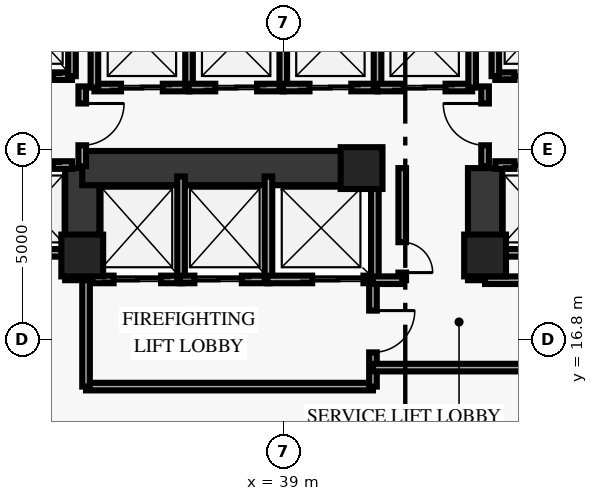
"""IFC4 building model, lengths in metres.
Left out: names, types, materials, properties, quantities, classifications, styles, units other than length and angle.
Written with IfcOpenShell. Run it as: python <this file> out.ifc"""

import sys

from ifc_helpers import new_model, si_unit, direction, frame, frame_2d, origin, origin_2d, place, context, subcontext, project, spatial, rectangle, extrude, element, fill, save


model = new_model("IFC4")
c1 = context("Model", 3, precision=1e-05, world=origin(), true_north=direction((0.0, 1.0)))
c2 = subcontext(c1, "Body", "Model", "MODEL_VIEW")
j1 = project(units=[si_unit("LENGTHUNIT", "METRE"), si_unit("PLANEANGLEUNIT", "RADIAN")], contexts=[c1])
p1 = place(None, origin())
s1 = spatial("IfcSite", under=j1, at=p1, CompositionType="ELEMENT")
p2 = place(p1, origin())
s2 = spatial("IfcBuilding", under=s1, at=p2, CompositionType="ELEMENT")
p3 = place(p2, origin())
s3 = spatial("IfcBuildingStorey", under=s2, at=p3, CompositionType="ELEMENT", Elevation=0.0)
for number, where, z_axis, x_axis in (
    (1, (33.7, 19.0, 0.0), (0.0, 0.0, 1.0), (1.0, 0.0, 0.0)),
    (2, (41.05, 21.3, 0.0), (0.0, 0.0, 1.0), (1.0, 0.0, 0.0)),
    (3, (44.3, 19.0, 0.0), (0.0, 0.0, 1.0), (1.0, 0.0, 0.0)),
):
    element("IfcColumn", number, at=place(p3, frame(where, z_axis=z_axis, x_axis=x_axis)), inside=s3, PredefinedType="PILASTER", context=c2, shape_type="SweptSolid", body=[
        extrude(rectangle(XDim=1.1, YDim=1.1, at=origin_2d()), origin(), (0.0, 0.0, 1.0), 5.7),
    ])
for number, where, z_axis, x_axis in (
    (4, (33.7, 18.35, 0.0), (0.0, 0.0, 1.0), (0.0, 1.0, 0.0)),
    (5, (44.3, 18.35, 0.0), (0.0, 0.0, 1.0), (0.0, 1.0, 0.0)),
):
    element("IfcWall", number, at=place(p3, frame(where, z_axis=z_axis, x_axis=x_axis)), inside=s3, PredefinedType="SHEAR", context=c2, shape_type="SweptSolid", body=[
        extrude(rectangle(XDim=2.95, YDim=0.9, at=frame_2d((1.475, 0.0))), origin(), (0.0, 0.0, 1.0), 5.7),
    ])
p4 = place(p3, frame((33.7, 21.3, 0.0), z_axis=(0.0, 0.0, 1.0), x_axis=(1.0, 0.0, 0.0)))
e6 = element("IfcWall", 6, at=p4, inside=s3, PredefinedType="SHEAR", context=c2, shape_type="SweptSolid", body=[
    extrude(rectangle(XDim=7.55, YDim=0.9, at=frame_2d((3.775, 0.0))), origin(), (0.0, 0.0, 1.0), 5.7),
])
p5 = place(p3, frame((31.32, 23.72, 0.0), z_axis=(0.0, 0.0, 1.0), x_axis=(1.0, 0.0, 0.0)))
e7 = element("IfcWall", 7, at=p5, inside=s3, PredefinedType="SOLIDWALL", context=c2, shape_type="SweptSolid", body=[
    extrude(rectangle(XDim=2.11, YDim=0.2, at=frame_2d((1.055, 0.0))), origin(), (0.0, 0.0, 1.0), 5.7),
])
p6 = place(p5, frame((0.505, 0.0, 0.0)))
e8 = element("IfcOpeningElement", 8, at=p6, cuts=e7, PredefinedType="OPENING", context=c2, shape_type="SweptSolid", body=[
    extrude(rectangle(XDim=1.1, YDim=2.15, at=frame_2d((0.55, 1.075))), frame((0.0, 0.11, 0.0), z_axis=(0.0, -1.0, 0.0), x_axis=(1.0, 0.0, 0.0)), (0.0, 0.0, 1.0), 0.22),
])
p7 = place(p3, frame((33.43, 23.72, 0.0), z_axis=(0.0, 0.0, 1.0), x_axis=(0.0, 1.0, 0.0)))
e9 = element("IfcWall", 9, at=p7, inside=s3, PredefinedType="SOLIDWALL", context=c2, shape_type="SweptSolid", body=[
    extrude(rectangle(XDim=2.41, YDim=0.2, at=frame_2d((1.205, 0.0))), origin(), (0.0, 0.0, 1.0), 5.7),
])
p8 = place(p3, frame((31.32, 19.07, 0.0), z_axis=(0.0, 0.0, 1.0), x_axis=(1.0, 0.0, 0.0)))
e10 = element("IfcWall", 10, at=p8, inside=s3, PredefinedType="SOLIDWALL", context=c2, shape_type="SweptSolid", body=[
    extrude(rectangle(XDim=2.11, YDim=0.2, at=frame_2d((1.055, 0.0))), origin(), (0.0, 0.0, 1.0), 5.7),
])
p9 = place(p3, frame((31.32, 21.38, 0.0), z_axis=(0.0, 0.0, 1.0), x_axis=(1.0, 0.0, 0.0)))
e11 = element("IfcWall", 11, at=p9, inside=s3, PredefinedType="SOLIDWALL", context=c2, shape_type="SweptSolid", body=[
    extrude(rectangle(XDim=2.11, YDim=0.2, at=frame_2d((1.055, 0.0))), origin(), (0.0, 0.0, 1.0), 5.7),
])
p10 = place(p9, frame((0.505, 0.0, 0.0)))
e12 = element("IfcOpeningElement", 12, at=p10, cuts=e11, PredefinedType="OPENING", context=c2, shape_type="SweptSolid", body=[
    extrude(rectangle(XDim=1.1, YDim=2.15, at=frame_2d((0.55, 1.075))), frame((0.0, 0.11, 0.0), z_axis=(0.0, -1.0, 0.0), x_axis=(1.0, 0.0, 0.0)), (0.0, 0.0, 1.0), 0.22),
])
p11 = place(p3, frame((44.57, 23.72, 0.0), z_axis=(0.0, 0.0, 1.0), x_axis=(1.0, 0.0, 0.0)))
e13 = element("IfcWall", 13, at=p11, inside=s3, PredefinedType="SOLIDWALL", context=c2, shape_type="SweptSolid", body=[
    extrude(rectangle(XDim=2.11, YDim=0.2, at=frame_2d((1.055, 0.0))), origin(), (0.0, 0.0, 1.0), 5.7),
])
p12 = place(p11, frame((0.505, 0.0, 0.0)))
e14 = element("IfcOpeningElement", 14, at=p12, cuts=e13, PredefinedType="OPENING", context=c2, shape_type="SweptSolid", body=[
    extrude(rectangle(XDim=1.1, YDim=2.15, at=frame_2d((0.55, 1.075))), frame((0.0, 0.11, 0.0), z_axis=(0.0, -1.0, 0.0), x_axis=(1.0, 0.0, 0.0)), (0.0, 0.0, 1.0), 0.22),
])
p13 = place(p3, frame((44.57, 23.72, 0.0), z_axis=(0.0, 0.0, 1.0), x_axis=(0.0, 1.0, 0.0)))
e15 = element("IfcWall", 15, at=p13, inside=s3, PredefinedType="SOLIDWALL", context=c2, shape_type="SweptSolid", body=[
    extrude(rectangle(XDim=2.41, YDim=0.2, at=frame_2d((1.205, 0.0))), origin(), (0.0, 0.0, 1.0), 5.7),
])
p14 = place(p3, frame((44.57, 19.07, 0.0), z_axis=(0.0, 0.0, 1.0), x_axis=(1.0, 0.0, 0.0)))
e16 = element("IfcWall", 16, at=p14, inside=s3, PredefinedType="SOLIDWALL", context=c2, shape_type="SweptSolid", body=[
    extrude(rectangle(XDim=2.11, YDim=0.2, at=frame_2d((1.055, 0.0))), origin(), (0.0, 0.0, 1.0), 5.7),
])
p15 = place(p3, frame((44.57, 21.38, 0.0), z_axis=(0.0, 0.0, 1.0), x_axis=(1.0, 0.0, 0.0)))
e17 = element("IfcWall", 17, at=p15, inside=s3, PredefinedType="SOLIDWALL", context=c2, shape_type="SweptSolid", body=[
    extrude(rectangle(XDim=2.11, YDim=0.2, at=frame_2d((1.055, 0.0))), origin(), (0.0, 0.0, 1.0), 5.7),
])
p16 = place(p15, frame((0.505, 0.0, 0.0)))
e18 = element("IfcOpeningElement", 18, at=p16, cuts=e17, PredefinedType="OPENING", context=c2, shape_type="SweptSolid", body=[
    extrude(rectangle(XDim=1.1, YDim=2.15, at=frame_2d((0.55, 1.075))), frame((0.0, 0.11, 0.0), z_axis=(0.0, -1.0, 0.0), x_axis=(1.0, 0.0, 0.0)), (0.0, 0.0, 1.0), 0.22),
])
p17 = place(p3, frame((34.02, 23.42, 0.0), z_axis=(0.0, 0.0, 1.0), x_axis=(1.0, 0.0, 0.0)))
e19 = element("IfcWall", 19, at=p17, inside=s3, PredefinedType="SOLIDWALL", context=c2, shape_type="SweptSolid", body=[
    extrude(rectangle(XDim=2.5, YDim=0.2, at=frame_2d((1.25, 0.0))), origin(), (0.0, 0.0, 1.0), 5.7),
])
p18 = place(p17, frame((0.7, 0.0, 0.0)))
e20 = element("IfcOpeningElement", 20, at=p18, cuts=e19, PredefinedType="OPENING", context=c2, shape_type="SweptSolid", body=[
    extrude(rectangle(XDim=1.1, YDim=2.15, at=frame_2d((0.55, 1.075))), frame((0.0, 0.11, 0.0), z_axis=(0.0, -1.0, 0.0), x_axis=(1.0, 0.0, 0.0)), (0.0, 0.0, 1.0), 0.22),
])
for number, where, z_axis, x_axis in (
    (21, (34.02, 23.42, 0.0), (0.0, 0.0, 1.0), (0.0, 1.0, 0.0)),
    (22, (36.51, 23.42, 0.0), (0.0, 0.0, 1.0), (0.0, 1.0, 0.0)),
):
    element("IfcWall", number, at=place(p3, frame(where, z_axis=z_axis, x_axis=x_axis)), inside=s3, PredefinedType="SOLIDWALL", context=c2, shape_type="SweptSolid", body=[
        extrude(rectangle(XDim=2.41, YDim=0.2, at=frame_2d((1.205, 0.0))), origin(), (0.0, 0.0, 1.0), 5.7),
    ])
p19 = place(p3, frame((36.5, 23.42, 0.0), z_axis=(0.0, 0.0, 1.0), x_axis=(1.0, 0.0, 0.0)))
e23 = element("IfcWall", 23, at=p19, inside=s3, PredefinedType="SOLIDWALL", context=c2, shape_type="SweptSolid", body=[
    extrude(rectangle(XDim=2.5, YDim=0.2, at=frame_2d((1.25, 0.0))), origin(), (0.0, 0.0, 1.0), 5.7),
])
p20 = place(p19, frame((0.7, 0.0, 0.0)))
e24 = element("IfcOpeningElement", 24, at=p20, cuts=e23, PredefinedType="OPENING", context=c2, shape_type="SweptSolid", body=[
    extrude(rectangle(XDim=1.1, YDim=2.15, at=frame_2d((0.55, 1.075))), frame((0.0, 0.11, 0.0), z_axis=(0.0, -1.0, 0.0), x_axis=(1.0, 0.0, 0.0)), (0.0, 0.0, 1.0), 0.22),
])
p21 = place(p3, frame((38.99, 23.42, 0.0), z_axis=(0.0, 0.0, 1.0), x_axis=(0.0, 1.0, 0.0)))
e25 = element("IfcWall", 25, at=p21, inside=s3, PredefinedType="SOLIDWALL", context=c2, shape_type="SweptSolid", body=[
    extrude(rectangle(XDim=2.41, YDim=0.2, at=frame_2d((1.205, 0.0))), origin(), (0.0, 0.0, 1.0), 5.7),
])
p22 = place(p3, frame((38.98, 23.42, 0.0), z_axis=(0.0, 0.0, 1.0), x_axis=(1.0, 0.0, 0.0)))
e26 = element("IfcWall", 26, at=p22, inside=s3, PredefinedType="SOLIDWALL", context=c2, shape_type="SweptSolid", body=[
    extrude(rectangle(XDim=2.5, YDim=0.2, at=frame_2d((1.25, 0.0))), origin(), (0.0, 0.0, 1.0), 5.7),
])
p23 = place(p22, frame((0.7, 0.0, 0.0)))
e27 = element("IfcOpeningElement", 27, at=p23, cuts=e26, PredefinedType="OPENING", context=c2, shape_type="SweptSolid", body=[
    extrude(rectangle(XDim=1.1, YDim=2.15, at=frame_2d((0.55, 1.075))), frame((0.0, 0.11, 0.0), z_axis=(0.0, -1.0, 0.0), x_axis=(1.0, 0.0, 0.0)), (0.0, 0.0, 1.0), 0.22),
])
p24 = place(p3, frame((41.47, 23.42, 0.0), z_axis=(0.0, 0.0, 1.0), x_axis=(0.0, 1.0, 0.0)))
e28 = element("IfcWall", 28, at=p24, inside=s3, PredefinedType="SOLIDWALL", context=c2, shape_type="SweptSolid", body=[
    extrude(rectangle(XDim=2.41, YDim=0.2, at=frame_2d((1.205, 0.0))), origin(), (0.0, 0.0, 1.0), 5.7),
])
p25 = place(p3, frame((41.46, 23.42, 0.0), z_axis=(0.0, 0.0, 1.0), x_axis=(1.0, 0.0, 0.0)))
e29 = element("IfcWall", 29, at=p25, inside=s3, PredefinedType="SOLIDWALL", context=c2, shape_type="SweptSolid", body=[
    extrude(rectangle(XDim=2.5, YDim=0.2, at=frame_2d((1.25, 0.0))), origin(), (0.0, 0.0, 1.0), 5.7),
])
p26 = place(p25, frame((0.7, 0.0, 0.0)))
e30 = element("IfcOpeningElement", 30, at=p26, cuts=e29, PredefinedType="OPENING", context=c2, shape_type="SweptSolid", body=[
    extrude(rectangle(XDim=1.1, YDim=2.15, at=frame_2d((0.55, 1.075))), frame((0.0, 0.11, 0.0), z_axis=(0.0, -1.0, 0.0), x_axis=(1.0, 0.0, 0.0)), (0.0, 0.0, 1.0), 0.22),
])
p27 = place(p3, frame((43.96, 23.42, 0.0), z_axis=(0.0, 0.0, 1.0), x_axis=(0.0, 1.0, 0.0)))
e31 = element("IfcWall", 31, at=p27, inside=s3, PredefinedType="SOLIDWALL", context=c2, shape_type="SweptSolid", body=[
    extrude(rectangle(XDim=2.41, YDim=0.2, at=frame_2d((1.205, 0.0))), origin(), (0.0, 0.0, 1.0), 5.7),
])
p28 = place(p3, frame((33.97, 18.37, 0.0), z_axis=(0.0, 0.0, 1.0), x_axis=(1.0, 0.0, 0.0)))
e32 = element("IfcWall", 32, at=p28, inside=s3, PredefinedType="SOLIDWALL", context=c2, shape_type="SweptSolid", body=[
    extrude(rectangle(XDim=2.36, YDim=0.2, at=frame_2d((1.18, 0.0))), origin(), (0.0, 0.0, 1.0), 5.7),
])
p29 = place(p28, frame((0.555, 0.0, 0.0)))
e33 = element("IfcOpeningElement", 33, at=p29, cuts=e32, PredefinedType="OPENING", context=c2, shape_type="SweptSolid", body=[
    extrude(rectangle(XDim=1.25, YDim=2.2, at=frame_2d((0.625, 1.1))), frame((0.0, 0.11, 0.0), z_axis=(0.0, -1.0, 0.0), x_axis=(1.0, 0.0, 0.0)), (0.0, 0.0, 1.0), 0.22),
])
p30 = place(p3, frame((36.3, 18.37, 0.0), z_axis=(0.0, 0.0, 1.0), x_axis=(0.0, 1.0, 0.0)))
e34 = element("IfcWall", 34, at=p30, inside=s3, PredefinedType="SOLIDWALL", context=c2, shape_type="SweptSolid", body=[
    extrude(rectangle(XDim=2.71, YDim=0.2, at=frame_2d((1.355, 0.0))), origin(), (0.0, 0.0, 1.0), 5.7),
])
p31 = place(p3, frame((36.27, 18.37, 0.0), z_axis=(0.0, 0.0, 1.0), x_axis=(1.0, 0.0, 0.0)))
e35 = element("IfcWall", 35, at=p31, inside=s3, PredefinedType="SOLIDWALL", context=c2, shape_type="SweptSolid", body=[
    extrude(rectangle(XDim=2.36, YDim=0.2, at=frame_2d((1.18, 0.0))), origin(), (0.0, 0.0, 1.0), 5.7),
])
p32 = place(p31, frame((0.38, 0.0, 0.0)))
e36 = element("IfcOpeningElement", 36, at=p32, cuts=e35, PredefinedType="OPENING", context=c2, shape_type="SweptSolid", body=[
    extrude(rectangle(XDim=1.25, YDim=2.2, at=frame_2d((0.625, 1.1))), frame((0.0, 0.11, 0.0), z_axis=(0.0, -1.0, 0.0), x_axis=(1.0, 0.0, 0.0)), (0.0, 0.0, 1.0), 0.22),
])
p33 = place(p3, frame((38.6, 18.37, 0.0), z_axis=(0.0, 0.0, 1.0), x_axis=(0.0, 1.0, 0.0)))
e37 = element("IfcWall", 37, at=p33, inside=s3, PredefinedType="SOLIDWALL", context=c2, shape_type="SweptSolid", body=[
    extrude(rectangle(XDim=2.71, YDim=0.2, at=frame_2d((1.355, 0.0))), origin(), (0.0, 0.0, 1.0), 5.7),
])
p34 = place(p3, frame((38.57, 18.37, 0.0), z_axis=(0.0, 0.0, 1.0), x_axis=(1.0, 0.0, 0.0)))
e38 = element("IfcWall", 38, at=p34, inside=s3, PredefinedType="SOLIDWALL", context=c2, shape_type="SweptSolid", body=[
    extrude(rectangle(XDim=2.83, YDim=0.2, at=frame_2d((1.415, 0.0))), origin(), (0.0, 0.0, 1.0), 5.7),
])
p35 = place(p34, frame((1.18, 0.0, 0.0)))
e39 = element("IfcOpeningElement", 39, at=p35, cuts=e38, PredefinedType="OPENING", context=c2, shape_type="SweptSolid", body=[
    extrude(rectangle(XDim=1.35, YDim=2.18, at=frame_2d((0.675, 1.09))), frame((0.0, 0.11, 0.0), z_axis=(0.0, -1.0, 0.0), x_axis=(1.0, 0.0, 0.0)), (0.0, 0.0, 1.0), 0.22),
])
p36 = place(p3, frame((41.4, 18.37, 0.0), z_axis=(0.0, 0.0, 1.0), x_axis=(0.0, 1.0, 0.0)))
e40 = element("IfcWall", 40, at=p36, inside=s3, PredefinedType="SOLIDWALL", context=c2, shape_type="SweptSolid", body=[
    extrude(rectangle(XDim=2.71, YDim=0.2, at=frame_2d((1.355, 0.0))), origin(), (0.0, 0.0, 1.0), 5.7),
])
p37 = place(p3, frame((33.7, 21.35, 0.0), z_axis=(0.0, 0.0, 1.0), x_axis=(0.0, 1.0, 0.0)))
e41 = element("IfcWall", 41, at=p37, inside=s3, PredefinedType="SOLIDWALL", context=c2, shape_type="SweptSolid", body=[
    extrude(rectangle(XDim=2.1, YDim=0.2, at=frame_2d((1.05, 0.0))), origin(), (0.0, 0.0, 1.0), 4.92),
])
p38 = place(p37, frame((0.55, 0.0, 0.0)))
e42 = element("IfcOpeningElement", 42, at=p38, cuts=e41, PredefinedType="OPENING", context=c2, shape_type="SweptSolid", body=[
    extrude(rectangle(XDim=1.1, YDim=2.15, at=frame_2d((0.55, 1.075))), frame((0.0, 0.11, 0.0), z_axis=(0.0, -1.0, 0.0), x_axis=(1.0, 0.0, 0.0)), (0.0, 0.0, 1.0), 0.22),
])
p39 = place(p3, frame((44.3, 23.45, 0.0), z_axis=(0.0, 0.0, 1.0), x_axis=(0.0, -1.0, 0.0)))
e43 = element("IfcWall", 43, at=p39, inside=s3, PredefinedType="SOLIDWALL", context=c2, shape_type="SweptSolid", body=[
    extrude(rectangle(XDim=2.1, YDim=0.2, at=frame_2d((1.05, 0.0))), origin(), (0.0, 0.0, 1.0), 4.92),
])
p40 = place(p39, frame((0.45, 0.0, 0.0)))
e44 = element("IfcOpeningElement", 44, at=p40, cuts=e43, PredefinedType="OPENING", context=c2, shape_type="SweptSolid", body=[
    extrude(rectangle(XDim=1.1, YDim=2.15, at=frame_2d((0.55, 1.075))), frame((0.0, 0.11, 0.0), z_axis=(0.0, -1.0, 0.0), x_axis=(1.0, 0.0, 0.0)), (0.0, 0.0, 1.0), 0.22),
])
p41 = place(p3, frame((33.8, 15.55, 0.0), z_axis=(0.0, 0.0, 1.0), x_axis=(1.0, 0.0, 0.0)))
e45 = element("IfcWall", 45, at=p41, inside=s3, PredefinedType="SOLIDWALL", context=c2, shape_type="SweptSolid", body=[
    extrude(rectangle(XDim=7.55, YDim=0.2, at=frame_2d((3.775, 0.0))), origin(), (0.0, 0.0, 1.0), 5.7),
])
p42 = place(p3, frame((33.8, 15.55, 0.0), z_axis=(0.0, 0.0, 1.0), x_axis=(0.0, 1.0, 0.0)))
e46 = element("IfcWall", 46, at=p42, inside=s3, PredefinedType="SOLIDWALL", context=c2, shape_type="SweptSolid", body=[
    extrude(rectangle(XDim=2.8, YDim=0.2, at=frame_2d((1.4, 0.0))), origin(), (0.0, 0.0, 1.0), 5.7),
])
p43 = place(p3, frame((41.35, 18.35, 0.0), z_axis=(0.0, 0.0, 1.0), x_axis=(0.0, -1.0, 0.0)))
e47 = element("IfcWall", 47, at=p43, inside=s3, PredefinedType="SOLIDWALL", context=c2, shape_type="SweptSolid", body=[
    extrude(rectangle(XDim=2.8, YDim=0.2, at=frame_2d((1.4, 0.0))), origin(), (0.0, 0.0, 1.0), 5.7),
])
p44 = place(p43, frame((0.8, 0.0, 0.0)))
e48 = element("IfcOpeningElement", 48, at=p44, cuts=e47, PredefinedType="OPENING", context=c2, shape_type="SweptSolid", body=[
    extrude(rectangle(XDim=1.1, YDim=2.15, at=frame_2d((0.55, 1.075))), frame((0.0, 0.11, 0.0), z_axis=(0.0, -1.0, 0.0), x_axis=(1.0, 0.0, 0.0)), (0.0, 0.0, 1.0), 0.22),
])
p45 = place(p3, frame((41.35, 16.05, 0.0), z_axis=(0.0, 0.0, 1.0), x_axis=(1.0, 0.0, 0.0)))
e49 = element("IfcWall", 49, at=p45, inside=s3, PredefinedType="SOLIDWALL", context=c2, shape_type="SweptSolid", body=[
    extrude(rectangle(XDim=4.5, YDim=0.2, at=frame_2d((2.25, 0.0))), origin(), (0.0, 0.0, 1.0), 5.7),
])
p46 = place(p3, frame((44.3, 18.35, 0.0), z_axis=(0.0, 0.0, 1.0), x_axis=(1.0, 0.0, 0.0)))
e50 = element("IfcWall", 50, at=p46, inside=s3, PredefinedType="SOLIDWALL", context=c2, shape_type="SweptSolid", body=[
    extrude(rectangle(XDim=1.55, YDim=0.2, at=frame_2d((0.775, 0.0))), origin(), (0.0, 0.0, 1.0), 5.7),
])
p47 = place(p3, frame((42.12, 18.35, 0.0), z_axis=(0.0, 0.0, 1.0), x_axis=(0.0, 1.0, 0.0)))
e51 = element("IfcWall", 51, at=p47, inside=s3, PredefinedType="SOLIDWALL", context=c2, shape_type="SweptSolid", body=[
    extrude(rectangle(XDim=2.95, YDim=0.2, at=frame_2d((1.475, 0.0))), origin(), (0.0, 0.0, 1.0), 5.7),
])
p48 = place(p47, frame((0.2, 0.0, 0.0)))
e52 = element("IfcOpeningElement", 52, at=p48, cuts=e51, PredefinedType="OPENING", context=c2, shape_type="SweptSolid", body=[
    extrude(rectangle(XDim=0.8, YDim=2.05, at=frame_2d((0.4, 1.025))), frame((0.0, 0.11, 0.0), z_axis=(0.0, -1.0, 0.0), x_axis=(1.0, 0.0, 0.0)), (0.0, 0.0, 1.0), 0.22),
])
p49 = place(p3, frame((41.35, 18.35, 0.0), z_axis=(0.0, 0.0, 1.0), x_axis=(1.0, 0.0, 0.0)))
e53 = element("IfcWall", 53, at=p49, inside=s3, PredefinedType="SOLIDWALL", context=c2, shape_type="SweptSolid", body=[
    extrude(rectangle(XDim=0.77, YDim=0.2, at=frame_2d((0.385, 0.0))), origin(), (0.0, 0.0, 1.0), 5.7),
])
p50 = place(p6, origin())
e54 = element("IfcDoor", 54, at=p50, inside=s3, OperationType="DOUBLE_DOOR_SLIDING", PredefinedType="DOOR", context=c2, shape_type="SweptSolid", body=[
    extrude(rectangle(XDim=1.1, YDim=2.15, at=frame_2d((0.55, 1.075))), frame((0.0, 0.025, 0.0), z_axis=(0.0, -1.0, 0.0), x_axis=(1.0, 0.0, 0.0)), (0.0, 0.0, 1.0), 0.05),
])
fill(e8, e54)
p51 = place(p10, origin())
e55 = element("IfcDoor", 55, at=p51, inside=s3, OperationType="DOUBLE_DOOR_SLIDING", PredefinedType="DOOR", context=c2, shape_type="SweptSolid", body=[
    extrude(rectangle(XDim=1.1, YDim=2.15, at=frame_2d((0.55, 1.075))), frame((0.0, 0.025, 0.0), z_axis=(0.0, -1.0, 0.0), x_axis=(1.0, 0.0, 0.0)), (0.0, 0.0, 1.0), 0.05),
])
fill(e12, e55)
p52 = place(p12, origin())
e56 = element("IfcDoor", 56, at=p52, inside=s3, OperationType="DOUBLE_DOOR_SLIDING", PredefinedType="DOOR", context=c2, shape_type="SweptSolid", body=[
    extrude(rectangle(XDim=1.1, YDim=2.15, at=frame_2d((0.55, 1.075))), frame((0.0, 0.025, 0.0), z_axis=(0.0, -1.0, 0.0), x_axis=(1.0, 0.0, 0.0)), (0.0, 0.0, 1.0), 0.05),
])
fill(e14, e56)
p53 = place(p16, origin())
e57 = element("IfcDoor", 57, at=p53, inside=s3, OperationType="DOUBLE_DOOR_SLIDING", PredefinedType="DOOR", context=c2, shape_type="SweptSolid", body=[
    extrude(rectangle(XDim=1.1, YDim=2.15, at=frame_2d((0.55, 1.075))), frame((0.0, 0.025, 0.0), z_axis=(0.0, -1.0, 0.0), x_axis=(1.0, 0.0, 0.0)), (0.0, 0.0, 1.0), 0.05),
])
fill(e18, e57)
p54 = place(p18, origin())
e58 = element("IfcDoor", 58, at=p54, inside=s3, OperationType="DOUBLE_DOOR_SLIDING", PredefinedType="DOOR", context=c2, shape_type="SweptSolid", body=[
    extrude(rectangle(XDim=1.1, YDim=2.15, at=frame_2d((0.55, 1.075))), frame((0.0, 0.025, 0.0), z_axis=(0.0, -1.0, 0.0), x_axis=(1.0, 0.0, 0.0)), (0.0, 0.0, 1.0), 0.05),
])
fill(e20, e58)
p55 = place(p20, origin())
e59 = element("IfcDoor", 59, at=p55, inside=s3, OperationType="DOUBLE_DOOR_SLIDING", PredefinedType="DOOR", context=c2, shape_type="SweptSolid", body=[
    extrude(rectangle(XDim=1.1, YDim=2.15, at=frame_2d((0.55, 1.075))), frame((0.0, 0.025, 0.0), z_axis=(0.0, -1.0, 0.0), x_axis=(1.0, 0.0, 0.0)), (0.0, 0.0, 1.0), 0.05),
])
fill(e24, e59)
p56 = place(p23, origin())
e60 = element("IfcDoor", 60, at=p56, inside=s3, OperationType="DOUBLE_DOOR_SLIDING", PredefinedType="DOOR", context=c2, shape_type="SweptSolid", body=[
    extrude(rectangle(XDim=1.1, YDim=2.15, at=frame_2d((0.55, 1.075))), frame((0.0, 0.025, 0.0), z_axis=(0.0, -1.0, 0.0), x_axis=(1.0, 0.0, 0.0)), (0.0, 0.0, 1.0), 0.05),
])
fill(e27, e60)
p57 = place(p26, origin())
e61 = element("IfcDoor", 61, at=p57, inside=s3, OperationType="DOUBLE_DOOR_SLIDING", PredefinedType="DOOR", context=c2, shape_type="SweptSolid", body=[
    extrude(rectangle(XDim=1.1, YDim=2.15, at=frame_2d((0.55, 1.075))), frame((0.0, 0.025, 0.0), z_axis=(0.0, -1.0, 0.0), x_axis=(1.0, 0.0, 0.0)), (0.0, 0.0, 1.0), 0.05),
])
fill(e30, e61)
p58 = place(p29, origin())
e62 = element("IfcDoor", 62, at=p58, inside=s3, OperationType="DOUBLE_DOOR_SLIDING", PredefinedType="DOOR", context=c2, shape_type="SweptSolid", body=[
    extrude(rectangle(XDim=1.25, YDim=2.2, at=frame_2d((0.625, 1.1))), frame((0.0, 0.025, 0.0), z_axis=(0.0, -1.0, 0.0), x_axis=(1.0, 0.0, 0.0)), (0.0, 0.0, 1.0), 0.05),
])
fill(e33, e62)
p59 = place(p32, origin())
e63 = element("IfcDoor", 63, at=p59, inside=s3, OperationType="DOUBLE_DOOR_SLIDING", PredefinedType="DOOR", context=c2, shape_type="SweptSolid", body=[
    extrude(rectangle(XDim=1.25, YDim=2.2, at=frame_2d((0.625, 1.1))), frame((0.0, 0.025, 0.0), z_axis=(0.0, -1.0, 0.0), x_axis=(1.0, 0.0, 0.0)), (0.0, 0.0, 1.0), 0.05),
])
fill(e36, e63)
p60 = place(p35, origin())
e64 = element("IfcDoor", 64, at=p60, inside=s3, OperationType="DOUBLE_DOOR_SLIDING", PredefinedType="DOOR", context=c2, shape_type="SweptSolid", body=[
    extrude(rectangle(XDim=1.35, YDim=2.18, at=frame_2d((0.675, 1.09))), frame((0.0, 0.025, 0.0), z_axis=(0.0, -1.0, 0.0), x_axis=(1.0, 0.0, 0.0)), (0.0, 0.0, 1.0), 0.05),
])
fill(e39, e64)
p61 = place(p38, origin())
e65 = element("IfcDoor", 65, at=p61, inside=s3, OperationType="SINGLE_SWING_RIGHT", PredefinedType="DOOR", context=c2, shape_type="SweptSolid", body=[
    extrude(rectangle(XDim=1.1, YDim=2.15, at=frame_2d((0.55, 1.075))), frame((0.0, 0.025, 0.0), z_axis=(0.0, -1.0, 0.0), x_axis=(1.0, 0.0, 0.0)), (0.0, 0.0, 1.0), 0.05),
])
fill(e42, e65)
p62 = place(p40, origin())
e66 = element("IfcDoor", 66, at=p62, inside=s3, OperationType="SINGLE_SWING_LEFT", PredefinedType="DOOR", context=c2, shape_type="SweptSolid", body=[
    extrude(rectangle(XDim=1.1, YDim=2.15, at=frame_2d((0.55, 1.075))), frame((0.0, 0.025, 0.0), z_axis=(0.0, -1.0, 0.0), x_axis=(1.0, 0.0, 0.0)), (0.0, 0.0, 1.0), 0.05),
])
fill(e44, e66)
p63 = place(p44, origin())
e67 = element("IfcDoor", 67, at=p63, inside=s3, OperationType="SINGLE_SWING_LEFT", PredefinedType="DOOR", context=c2, shape_type="SweptSolid", body=[
    extrude(rectangle(XDim=1.1, YDim=2.15, at=frame_2d((0.55, 1.075))), frame((0.0, 0.025, 0.0), z_axis=(0.0, -1.0, 0.0), x_axis=(1.0, 0.0, 0.0)), (0.0, 0.0, 1.0), 0.05),
])
fill(e48, e67)
p64 = place(p48, origin())
e68 = element("IfcDoor", 68, at=p64, inside=s3, OperationType="SINGLE_SWING_LEFT", PredefinedType="DOOR", context=c2, shape_type="SweptSolid", body=[
    extrude(rectangle(XDim=0.8, YDim=2.05, at=frame_2d((0.4, 1.025))), frame((0.0, 0.025, 0.0), z_axis=(0.0, -1.0, 0.0), x_axis=(1.0, 0.0, 0.0)), (0.0, 0.0, 1.0), 0.05),
])
fill(e52, e68)
save(model, sys.argv[1])
